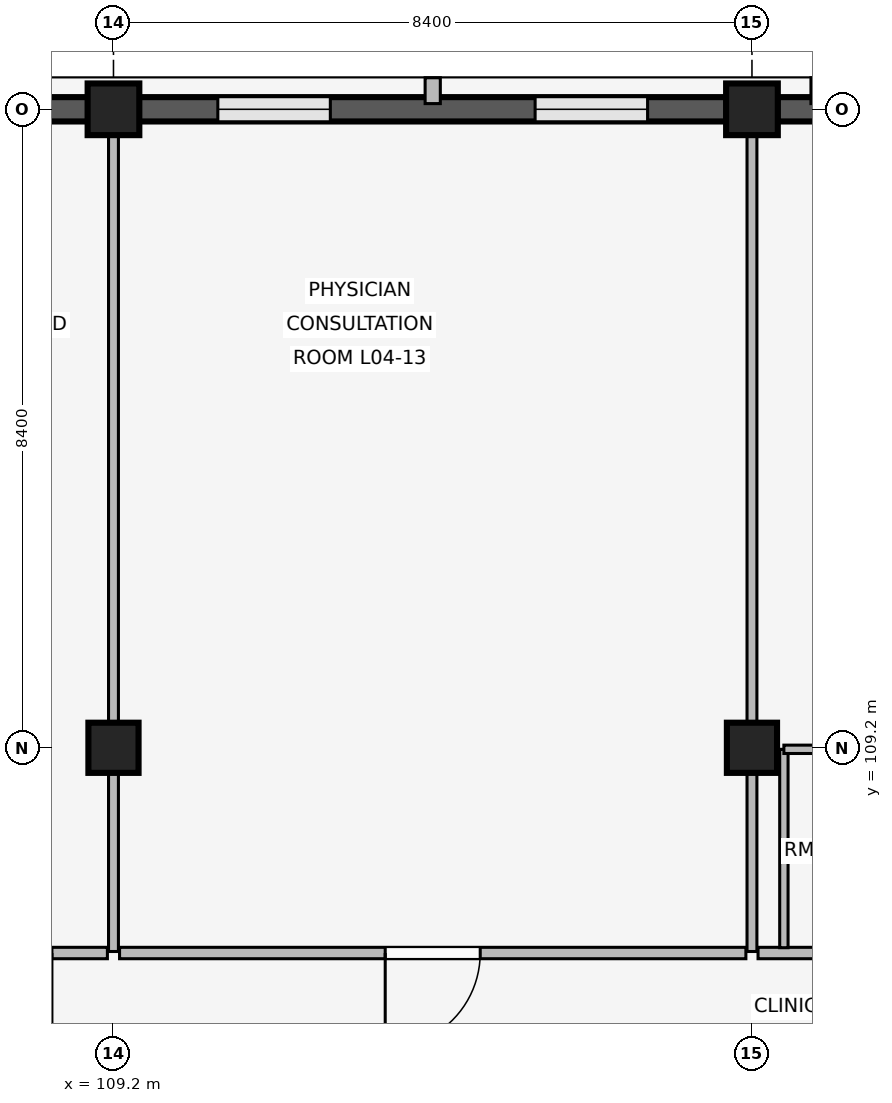
"""IFC4 building model, lengths in metres.
Left out: names, types, materials, properties, quantities, classifications, styles, units other than length and angle.
Written with IfcOpenShell. Run it as: python <this file> out.ifc"""

import sys

from ifc_helpers import new_model, si_unit, direction, frame, frame_2d, origin, origin_2d, place, context, subcontext, project, spatial, rectangle, extrude, element, fill, save


model = new_model("IFC4")
c1 = context("Model", 3, precision=1e-05, world=origin(), true_north=direction((0.0, 1.0)))
c2 = subcontext(c1, "Body", "Model", "MODEL_VIEW")
j1 = project(units=[si_unit("LENGTHUNIT", "METRE"), si_unit("PLANEANGLEUNIT", "RADIAN")], contexts=[c1])
p1 = place(None, origin())
s1 = spatial("IfcSite", under=j1, at=p1, CompositionType="ELEMENT")
p2 = place(p1, origin())
s2 = spatial("IfcBuilding", under=s1, at=p2, CompositionType="ELEMENT")
p3 = place(p2, frame((0.0, 0.0, 16.2)))
s3 = spatial("IfcBuildingStorey", under=s2, at=p3, CompositionType="ELEMENT", Elevation=16.2)
p4 = place(p3, frame((109.2, 109.2, 0.0), z_axis=(0.0, 0.0, 1.0), x_axis=(1.0, 0.0, 0.0)))
e1 = element("IfcColumn", 1, at=p4, inside=s3, PredefinedType="COLUMN", context=c2, shape_type="SweptSolid", body=[
    extrude(rectangle(XDim=0.66, YDim=0.66, at=origin_2d()), origin(), (0.0, 0.0, 1.0), 4.2),
])
p5 = place(p3, frame((109.2, 117.6, 0.0), z_axis=(0.0, 0.0, 1.0), x_axis=(1.0, 0.0, 0.0)))
e2 = element("IfcColumn", 2, at=p5, inside=s3, PredefinedType="COLUMN", context=c2, shape_type="SweptSolid", body=[
    extrude(rectangle(XDim=0.68, YDim=0.68, at=origin_2d()), origin(), (0.0, 0.0, 1.0), 4.2),
])
p6 = place(p3, frame((117.6, 109.2, 0.0), z_axis=(0.0, 0.0, 1.0), x_axis=(1.0, 0.0, 0.0)))
e3 = element("IfcColumn", 3, at=p6, inside=s3, PredefinedType="COLUMN", context=c2, shape_type="SweptSolid", body=[
    extrude(rectangle(XDim=0.66, YDim=0.66, at=origin_2d()), origin(), (0.0, 0.0, 1.0), 4.2),
])
p7 = place(p3, frame((117.6, 117.6, 0.0), z_axis=(0.0, 0.0, 1.0), x_axis=(1.0, 0.0, 0.0)))
e4 = element("IfcColumn", 4, at=p7, inside=s3, PredefinedType="COLUMN", context=c2, shape_type="SweptSolid", body=[
    extrude(rectangle(XDim=0.68, YDim=0.68, at=origin_2d()), origin(), (0.0, 0.0, 1.0), 4.2),
])
p8 = place(p3, frame((101.135, 117.6, 0.0), z_axis=(0.0, 0.0, 1.0), x_axis=(1.0, 0.0, 0.0)))
e5 = element("IfcWall", 5, at=p8, inside=s3, PredefinedType="SOLIDWALL", context=c2, shape_type="SweptSolid", body=[
    extrude(rectangle(XDim=7.73, YDim=0.32, at=frame_2d((3.865, 0.0))), origin(), (0.0, 0.0, 1.0), 3.32),
])
p9 = place(p8, frame((0.988, 0.0, 0.85)))
e6 = element("IfcOpeningElement", 6, at=p9, cuts=e5, PredefinedType="OPENING", context=c2, shape_type="SweptSolid", body=[
    extrude(rectangle(XDim=1.58, YDim=1.7, at=frame_2d((0.79, 0.85))), frame((0.0, 0.17, 0.0), z_axis=(0.0, -1.0, 0.0), x_axis=(1.0, 0.0, 0.0)), (0.0, 0.0, 1.0), 0.34),
])
p10 = place(p8, frame((5.162, 0.0, 0.85)))
e7 = element("IfcOpeningElement", 7, at=p10, cuts=e5, PredefinedType="OPENING", context=c2, shape_type="SweptSolid", body=[
    extrude(rectangle(XDim=1.58, YDim=1.7, at=frame_2d((0.79, 0.85))), frame((0.0, 0.17, 0.0), z_axis=(0.0, -1.0, 0.0), x_axis=(1.0, 0.0, 0.0)), (0.0, 0.0, 1.0), 0.34),
])
p11 = place(p3, frame((109.535, 117.6, 0.0), z_axis=(0.0, 0.0, 1.0), x_axis=(1.0, 0.0, 0.0)))
e8 = element("IfcWall", 8, at=p11, inside=s3, PredefinedType="SOLIDWALL", context=c2, shape_type="SweptSolid", body=[
    extrude(rectangle(XDim=7.73, YDim=0.32, at=frame_2d((3.865, 0.0))), origin(), (0.0, 0.0, 1.0), 3.32),
])
p12 = place(p11, frame((1.038, 0.0, 0.85)))
e9 = element("IfcOpeningElement", 9, at=p12, cuts=e8, PredefinedType="OPENING", context=c2, shape_type="SweptSolid", body=[
    extrude(rectangle(XDim=1.48, YDim=1.6, at=frame_2d((0.74, 0.8))), frame((0.0, 0.17, 0.0), z_axis=(0.0, -1.0, 0.0), x_axis=(1.0, 0.0, 0.0)), (0.0, 0.0, 1.0), 0.34),
])
p13 = place(p11, frame((5.212, 0.0, 0.85)))
e10 = element("IfcOpeningElement", 10, at=p13, cuts=e8, PredefinedType="OPENING", context=c2, shape_type="SweptSolid", body=[
    extrude(rectangle(XDim=1.48, YDim=1.6, at=frame_2d((0.74, 0.8))), frame((0.0, 0.17, 0.0), z_axis=(0.0, -1.0, 0.0), x_axis=(1.0, 0.0, 0.0)), (0.0, 0.0, 1.0), 0.34),
])
p14 = place(p3, frame((113.4, 117.675, 0.0), z_axis=(0.0, 0.0, 1.0), x_axis=(0.0, 1.0, 0.0)))
e11 = element("IfcWall", 11, at=p14, inside=s3, PredefinedType="ELEMENTEDWALL", context=c2, shape_type="SweptSolid", body=[
    extrude(rectangle(XDim=0.34, YDim=0.2, at=frame_2d((0.17, 0.0))), origin(), (0.0, 0.0, 1.0), 3.3),
])
p15 = place(p3, frame((117.935, 117.6, 0.0), z_axis=(0.0, 0.0, 1.0), x_axis=(1.0, 0.0, 0.0)))
e12 = element("IfcWall", 12, at=p15, inside=s3, PredefinedType="SOLIDWALL", context=c2, shape_type="SweptSolid", body=[
    extrude(rectangle(XDim=7.73, YDim=0.32, at=frame_2d((3.865, 0.0))), origin(), (0.0, 0.0, 1.0), 3.32),
])
p16 = place(p15, frame((1.068, 0.0, 0.85)))
e13 = element("IfcOpeningElement", 13, at=p16, cuts=e12, PredefinedType="OPENING", context=c2, shape_type="SweptSolid", body=[
    extrude(rectangle(XDim=1.42, YDim=1.45, at=frame_2d((0.71, 0.725))), frame((0.0, 0.17, 0.0), z_axis=(0.0, -1.0, 0.0), x_axis=(1.0, 0.0, 0.0)), (0.0, 0.0, 1.0), 0.34),
])
p17 = place(p15, frame((5.242, 0.0, 0.85)))
e14 = element("IfcOpeningElement", 14, at=p17, cuts=e12, PredefinedType="OPENING", context=c2, shape_type="SweptSolid", body=[
    extrude(rectangle(XDim=1.42, YDim=1.45, at=frame_2d((0.71, 0.725))), frame((0.0, 0.17, 0.0), z_axis=(0.0, -1.0, 0.0), x_axis=(1.0, 0.0, 0.0)), (0.0, 0.0, 1.0), 0.34),
])
p18 = place(p3, frame((118.476, 117.675, 0.0), z_axis=(0.0, 0.0, 1.0), x_axis=(0.0, 1.0, 0.0)))
e15 = element("IfcWall", 15, at=p18, inside=s3, PredefinedType="ELEMENTEDWALL", context=c2, shape_type="SweptSolid", body=[
    extrude(rectangle(XDim=0.34, YDim=0.2, at=frame_2d((0.17, 0.0))), origin(), (0.0, 0.0, 1.0), 3.3),
])
p19 = place(p3, frame((109.12, 106.5, 0.0), z_axis=(0.0, 0.0, 1.0), x_axis=(-1.0, 0.0, 0.0)))
e16 = element("IfcWall", 16, at=p19, inside=s3, PredefinedType="PARTITIONING", context=c2, shape_type="SweptSolid", body=[
    extrude(rectangle(XDim=8.24, YDim=0.15, at=frame_2d((4.12, 0.0))), origin(), (0.0, 0.0, 1.0), 3.3),
])
p20 = place(p19, frame((0.73, 0.0, 0.0)))
e17 = element("IfcOpeningElement", 17, at=p20, cuts=e16, PredefinedType="OPENING", context=c2, shape_type="SweptSolid", body=[
    extrude(rectangle(XDim=1.3, YDim=2.25, at=frame_2d((0.65, 1.125))), frame((0.0, 0.085, 0.0), z_axis=(0.0, -1.0, 0.0), x_axis=(1.0, 0.0, 0.0)), (0.0, 0.0, 1.0), 0.17),
])
p21 = place(p19, frame((4.43, 0.0, 0.0)))
e18 = element("IfcOpeningElement", 18, at=p21, cuts=e16, PredefinedType="OPENING", context=c2, shape_type="SweptSolid", body=[
    extrude(rectangle(XDim=1.3, YDim=2.25, at=frame_2d((0.65, 1.125))), frame((0.0, 0.085, 0.0), z_axis=(0.0, -1.0, 0.0), x_axis=(1.0, 0.0, 0.0)), (0.0, 0.0, 1.0), 0.17),
])
p22 = place(p3, frame((109.2, 106.52, 0.0), z_axis=(0.0, 0.0, 1.0), x_axis=(0.0, 1.0, 0.0)))
e19 = element("IfcWall", 19, at=p22, inside=s3, PredefinedType="PARTITIONING", context=c2, shape_type="SweptSolid", body=[
    extrude(rectangle(XDim=10.94, YDim=0.13, at=frame_2d((5.47, 0.0))), origin(), (0.0, 0.0, 1.0), 3.3),
])
p23 = place(p3, frame((117.52, 106.5, 0.0), z_axis=(0.0, 0.0, 1.0), x_axis=(-1.0, 0.0, 0.0)))
e20 = element("IfcWall", 20, at=p23, inside=s3, PredefinedType="PARTITIONING", context=c2, shape_type="SweptSolid", body=[
    extrude(rectangle(XDim=8.24, YDim=0.15, at=frame_2d((4.12, 0.0))), origin(), (0.0, 0.0, 1.0), 3.3),
])
p24 = place(p23, frame((3.495, 0.0, 0.0)))
e21 = element("IfcOpeningElement", 21, at=p24, cuts=e20, PredefinedType="OPENING", context=c2, shape_type="SweptSolid", body=[
    extrude(rectangle(XDim=1.25, YDim=2.2, at=frame_2d((0.625, 1.1))), frame((0.0, 0.085, 0.0), z_axis=(0.0, -1.0, 0.0), x_axis=(1.0, 0.0, 0.0)), (0.0, 0.0, 1.0), 0.17),
])
p25 = place(p3, frame((117.6, 106.52, 0.0), z_axis=(0.0, 0.0, 1.0), x_axis=(0.0, 1.0, 0.0)))
e22 = element("IfcWall", 22, at=p25, inside=s3, PredefinedType="PARTITIONING", context=c2, shape_type="SweptSolid", body=[
    extrude(rectangle(XDim=10.94, YDim=0.13, at=frame_2d((5.47, 0.0))), origin(), (0.0, 0.0, 1.0), 3.3),
])
p26 = place(p3, frame((125.92, 106.5, 0.0), z_axis=(0.0, 0.0, 1.0), x_axis=(-1.0, 0.0, 0.0)))
e23 = element("IfcWall", 23, at=p26, inside=s3, PredefinedType="PARTITIONING", context=c2, shape_type="SweptSolid", body=[
    extrude(rectangle(XDim=8.24, YDim=0.15, at=frame_2d((4.12, 0.0))), origin(), (0.0, 0.0, 1.0), 3.3),
])
p27 = place(p26, frame((0.73, 0.0, 0.0)))
e24 = element("IfcOpeningElement", 24, at=p27, cuts=e23, PredefinedType="OPENING", context=c2, shape_type="SweptSolid", body=[
    extrude(rectangle(XDim=1.3, YDim=2.25, at=frame_2d((0.65, 1.125))), frame((0.0, 0.085, 0.0), z_axis=(0.0, -1.0, 0.0), x_axis=(1.0, 0.0, 0.0)), (0.0, 0.0, 1.0), 0.17),
])
p28 = place(p26, frame((4.43, 0.0, 0.0)))
e25 = element("IfcOpeningElement", 25, at=p28, cuts=e23, PredefinedType="OPENING", context=c2, shape_type="SweptSolid", body=[
    extrude(rectangle(XDim=1.3, YDim=2.25, at=frame_2d((0.65, 1.125))), frame((0.0, 0.085, 0.0), z_axis=(0.0, -1.0, 0.0), x_axis=(1.0, 0.0, 0.0)), (0.0, 0.0, 1.0), 0.17),
])
p29 = place(p3, frame((118.02, 106.57, 0.0), z_axis=(0.0, 0.0, 1.0), x_axis=(0.0, 1.0, 0.0)))
e26 = element("IfcWall", 26, at=p29, inside=s3, PredefinedType="PARTITIONING", context=c2, shape_type="SweptSolid", body=[
    extrude(rectangle(XDim=2.61, YDim=0.11, at=frame_2d((1.305, 0.0))), origin(), (0.0, 0.0, 1.0), 3.3),
])
p30 = place(p3, frame((118.02, 109.18, 0.0), z_axis=(0.0, 0.0, 1.0), x_axis=(1.0, 0.0, 0.0)))
e27 = element("IfcWall", 27, at=p30, inside=s3, PredefinedType="PARTITIONING", context=c2, shape_type="SweptSolid", body=[
    extrude(rectangle(XDim=1.98, YDim=0.11, at=frame_2d((0.99, 0.0))), origin(), (0.0, 0.0, 1.0), 3.3),
])
p31 = place(p30, frame((0.54, 0.0, 0.0)))
e28 = element("IfcOpeningElement", 28, at=p31, cuts=e27, PredefinedType="OPENING", context=c2, shape_type="SweptSolid", body=[
    extrude(rectangle(XDim=0.9, YDim=2.1, at=frame_2d((0.45, 1.05))), frame((0.0, 0.065, 0.0), z_axis=(0.0, -1.0, 0.0), x_axis=(1.0, 0.0, 0.0)), (0.0, 0.0, 1.0), 0.13),
])
p32 = place(p12, origin())
e29 = element("IfcWindow", 29, at=p32, inside=s3, PartitioningType="SINGLE_PANEL", PredefinedType="WINDOW", context=c2, shape_type="SweptSolid", body=[
    extrude(rectangle(XDim=1.48, YDim=1.6, at=frame_2d((0.74, 0.8))), frame((0.0, 0.03, 0.0), z_axis=(0.0, -1.0, 0.0), x_axis=(1.0, 0.0, 0.0)), (0.0, 0.0, 1.0), 0.06),
])
fill(e9, e29)
p33 = place(p13, origin())
e30 = element("IfcWindow", 30, at=p33, inside=s3, PartitioningType="SINGLE_PANEL", PredefinedType="WINDOW", context=c2, shape_type="SweptSolid", body=[
    extrude(rectangle(XDim=1.48, YDim=1.6, at=frame_2d((0.74, 0.8))), frame((0.0, 0.03, 0.0), z_axis=(0.0, -1.0, 0.0), x_axis=(1.0, 0.0, 0.0)), (0.0, 0.0, 1.0), 0.06),
])
fill(e10, e30)
p34 = place(p24, origin())
e31 = element("IfcDoor", 31, at=p34, inside=s3, OperationType="SINGLE_SWING_RIGHT", PredefinedType="DOOR", context=c2, shape_type="SweptSolid", body=[
    extrude(rectangle(XDim=1.25, YDim=2.2, at=frame_2d((0.625, 1.1))), frame((0.0, 0.025, 0.0), z_axis=(0.0, -1.0, 0.0), x_axis=(1.0, 0.0, 0.0)), (0.0, 0.0, 1.0), 0.05),
])
fill(e21, e31)
save(model, sys.argv[1])
